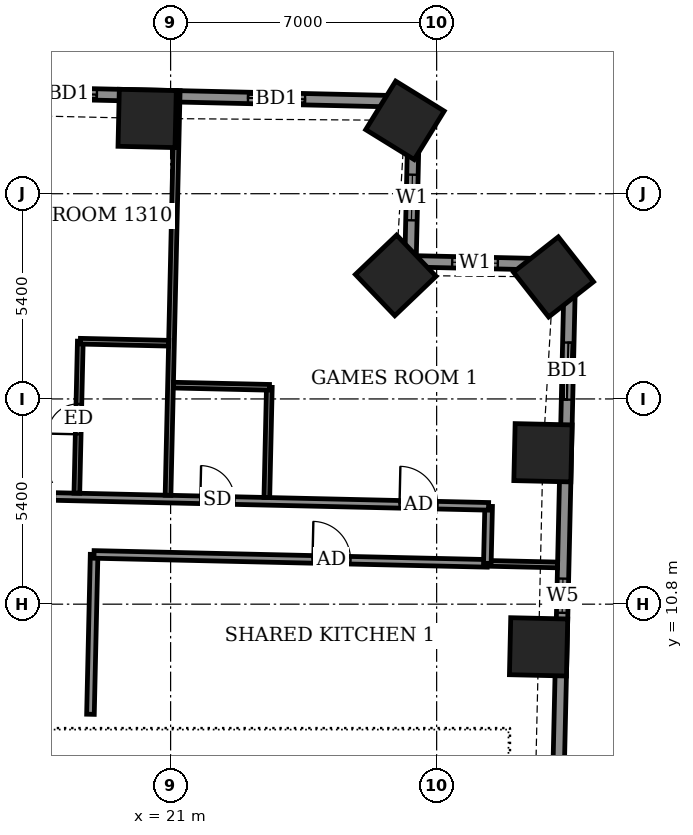
"""IFC4 building model, lengths in metres.
Left out: names, types, materials, properties, quantities, classifications, styles, units other than length and angle.
Written with IfcOpenShell. Run it as: python <this file> out.ifc"""

import sys

from ifc_helpers import new_model, si_unit, direction, frame, frame_2d, origin, origin_2d, place, context, subcontext, project, spatial, rectangle, extrude, element, fill, save


model = new_model("IFC4")
c1 = context("Model", 3, precision=1e-05, world=origin(), true_north=direction((0.0, 1.0)))
c2 = subcontext(c1, "Body", "Model", "MODEL_VIEW")
j1 = project(units=[si_unit("LENGTHUNIT", "METRE"), si_unit("PLANEANGLEUNIT", "RADIAN")], contexts=[c1])
p1 = place(None, origin())
s1 = spatial("IfcSite", under=j1, at=p1, CompositionType="ELEMENT")
p2 = place(p1, origin())
s2 = spatial("IfcBuilding", under=s1, at=p2, CompositionType="ELEMENT")
p3 = place(p2, frame((0.0, 0.0, 56.7)))
s3 = spatial("IfcBuildingStorey", under=s2, at=p3, CompositionType="ELEMENT", Elevation=56.7)
for number, where, z_axis, x_axis in (
    (1, (30.682, 9.677, -0.55), (0.0, 0.0, 1.0), (0.023, 1.0, 0.0)),
    (2, (30.798, 14.784, -0.55), (0.0, 0.0, 1.0), (0.023, 1.0, 0.0)),
    (3, (31.074, 19.41, -0.55), (0.0, 0.0, 1.0), (-0.617, 0.787, 0.0)),
    (4, (26.923, 19.451, -0.55), (0.0, 0.0, 1.0), (-0.691, 0.723, 0.0)),
    (5, (27.166, 23.53, -0.55), (0.0, 0.0, 1.0), (-0.851, 0.525, 0.0)),
    (6, (20.383, 23.58, -0.55), (0.0, 0.0, 1.0), (-1.0, 0.023, 0.0)),
):
    element("IfcColumn", number, at=place(p3, frame(where, z_axis=z_axis, x_axis=x_axis)), inside=s3, PredefinedType="COLUMN", context=c2, shape_type="SweptSolid", body=[
        extrude(rectangle(XDim=1.5, YDim=1.5, at=origin_2d()), origin(), (0.0, 0.0, 1.0), 3.6),
    ])
p4 = place(p3, frame((31.165, 4.502, 0.0), z_axis=(0.0, 0.0, 1.0), x_axis=(0.022716307128, 0.999741951401, 0.0)))
e7 = element("IfcWall", 7, at=p4, inside=s3, PredefinedType="SOLIDWALL", context=c2, shape_type="SweptSolid", body=[
    extrude(rectangle(XDim=15.229, YDim=0.3, at=frame_2d((7.615, 0.0))), origin(), (0.0, 0.0, 1.0), 3.05),
])
p5 = place(p4, frame((6.072, 0.0, 0.9)))
e8 = element("IfcOpeningElement", 8, at=p5, cuts=e7, PredefinedType="OPENING", context=c2, shape_type="SweptSolid", body=[
    extrude(rectangle(XDim=0.9, YDim=1.5, at=frame_2d((0.45, 0.75))), frame((0.0, 0.16, 0.0), z_axis=(0.0, -1.0, 0.0), x_axis=(1.0, 0.0, 0.0)), (0.0, 0.0, 1.0), 0.32),
])
p6 = place(p4, frame((11.684, 0.0, 0.0)))
e9 = element("IfcOpeningElement", 9, at=p6, cuts=e7, PredefinedType="OPENING", context=c2, shape_type="SweptSolid", body=[
    extrude(rectangle(XDim=1.5, YDim=2.4, at=frame_2d((0.75, 1.2))), frame((0.0, 0.16, 0.0), z_axis=(0.0, -1.0, 0.0), x_axis=(1.0, 0.0, 0.0)), (0.0, 0.0, 1.0), 0.32),
])
p7 = place(p3, frame((31.511, 19.727, 0.0), z_axis=(0.0, 0.0, 1.0), x_axis=(-0.999744320311, 0.022611811187, 0.0)))
e10 = element("IfcWall", 10, at=p7, inside=s3, PredefinedType="SOLIDWALL", context=c2, shape_type="SweptSolid", body=[
    extrude(rectangle(XDim=4.2, YDim=0.3, at=frame_2d((2.1, 0.0))), origin(), (0.0, 0.0, 1.0), 3.05),
])
p8 = place(p7, frame((1.902, 0.0, 0.9)))
e11 = element("IfcOpeningElement", 11, at=p8, cuts=e10, PredefinedType="OPENING", context=c2, shape_type="SweptSolid", body=[
    extrude(rectangle(XDim=1.2, YDim=1.5, at=frame_2d((0.6, 0.75))), frame((0.0, 0.16, 0.0), z_axis=(0.0, -1.0, 0.0), x_axis=(1.0, 0.0, 0.0)), (0.0, 0.0, 1.0), 0.32),
])
p9 = place(p3, frame((27.312, 19.822, 0.0), z_axis=(0.0, 0.0, 1.0), x_axis=(0.022611811187, 0.999744320311, 0.0)))
e12 = element("IfcWall", 12, at=p9, inside=s3, PredefinedType="SOLIDWALL", context=c2, shape_type="SweptSolid", body=[
    extrude(rectangle(XDim=4.2, YDim=0.3, at=frame_2d((2.1, 0.0))), origin(), (0.0, 0.0, 1.0), 2.55),
])
p10 = place(p9, frame((1.079, 0.0, 0.9)))
e13 = element("IfcOpeningElement", 13, at=p10, cuts=e12, PredefinedType="OPENING", context=c2, shape_type="SweptSolid", body=[
    extrude(rectangle(XDim=1.2, YDim=1.5, at=frame_2d((0.6, 0.75))), frame((0.0, 0.16, 0.0), z_axis=(0.0, -1.0, 0.0), x_axis=(1.0, 0.0, 0.0)), (0.0, 0.0, 1.0), 0.32),
])
p11 = place(p3, frame((27.407, 24.021, 0.0), z_axis=(0.0, 0.0, 1.0), x_axis=(-0.99974239923, 0.022696589664, 0.0)))
e14 = element("IfcWall", 14, at=p11, inside=s3, PredefinedType="SOLIDWALL", context=c2, shape_type="SweptSolid", body=[
    extrude(rectangle(XDim=49.836, YDim=0.3, at=frame_2d((24.918, 0.0))), origin(), (0.0, 0.0, 1.0), 3.05),
])
p12 = place(p11, frame((2.871, 0.0, 0.0)))
e15 = element("IfcOpeningElement", 15, at=p12, cuts=e14, PredefinedType="OPENING", context=c2, shape_type="SweptSolid", body=[
    extrude(rectangle(XDim=1.5, YDim=2.4, at=frame_2d((0.75, 1.2))), frame((0.0, 0.16, 0.0), z_axis=(0.0, -1.0, 0.0), x_axis=(1.0, 0.0, 0.0)), (0.0, 0.0, 1.0), 0.32),
])
p13 = place(p11, frame((8.349, 0.0, 0.0)))
e16 = element("IfcOpeningElement", 16, at=p13, cuts=e14, PredefinedType="OPENING", context=c2, shape_type="SweptSolid", body=[
    extrude(rectangle(XDim=1.5, YDim=2.4, at=frame_2d((0.75, 1.2))), frame((0.0, 0.16, 0.0), z_axis=(0.0, -1.0, 0.0), x_axis=(1.0, 0.0, 0.0)), (0.0, 0.0, 1.0), 0.32),
])
p14 = place(p11, frame((11.43, 0.0, 0.0)))
e17 = element("IfcOpeningElement", 17, at=p14, cuts=e14, PredefinedType="OPENING", context=c2, shape_type="SweptSolid", body=[
    extrude(rectangle(XDim=1.5, YDim=2.4, at=frame_2d((0.75, 1.2))), frame((0.0, 0.16, 0.0), z_axis=(0.0, -1.0, 0.0), x_axis=(1.0, 0.0, 0.0)), (0.0, 0.0, 1.0), 0.32),
])
p15 = place(p11, frame((17.236, 0.0, 0.0)))
e18 = element("IfcOpeningElement", 18, at=p15, cuts=e14, PredefinedType="OPENING", context=c2, shape_type="SweptSolid", body=[
    extrude(rectangle(XDim=1.5, YDim=2.4, at=frame_2d((0.75, 1.2))), frame((0.0, 0.16, 0.0), z_axis=(0.0, -1.0, 0.0), x_axis=(1.0, 0.0, 0.0)), (0.0, 0.0, 1.0), 0.32),
])
p16 = place(p11, frame((22.686, 0.0, 0.0)))
e19 = element("IfcOpeningElement", 19, at=p16, cuts=e14, PredefinedType="OPENING", context=c2, shape_type="SweptSolid", body=[
    extrude(rectangle(XDim=1.5, YDim=2.4, at=frame_2d((0.75, 1.2))), frame((0.0, 0.16, 0.0), z_axis=(0.0, -1.0, 0.0), x_axis=(1.0, 0.0, 0.0)), (0.0, 0.0, 1.0), 0.32),
])
p17 = place(p11, frame((25.767, 0.0, 0.0)))
e20 = element("IfcOpeningElement", 20, at=p17, cuts=e14, PredefinedType="OPENING", context=c2, shape_type="SweptSolid", body=[
    extrude(rectangle(XDim=1.5, YDim=2.4, at=frame_2d((0.75, 1.2))), frame((0.0, 0.16, 0.0), z_axis=(0.0, -1.0, 0.0), x_axis=(1.0, 0.0, 0.0)), (0.0, 0.0, 1.0), 0.32),
])
p18 = place(p11, frame((31.211, 0.0, 0.0)))
e21 = element("IfcOpeningElement", 21, at=p18, cuts=e14, PredefinedType="OPENING", context=c2, shape_type="SweptSolid", body=[
    extrude(rectangle(XDim=1.5, YDim=2.4, at=frame_2d((0.75, 1.2))), frame((0.0, 0.16, 0.0), z_axis=(0.0, -1.0, 0.0), x_axis=(1.0, 0.0, 0.0)), (0.0, 0.0, 1.0), 0.32),
])
p19 = place(p11, frame((36.974, 0.0, 0.0)))
e22 = element("IfcOpeningElement", 22, at=p19, cuts=e14, PredefinedType="OPENING", context=c2, shape_type="SweptSolid", body=[
    extrude(rectangle(XDim=1.5, YDim=2.4, at=frame_2d((0.75, 1.2))), frame((0.0, 0.16, 0.0), z_axis=(0.0, -1.0, 0.0), x_axis=(1.0, 0.0, 0.0)), (0.0, 0.0, 1.0), 0.32),
])
p20 = place(p11, frame((40.055, 0.0, 0.0)))
e23 = element("IfcOpeningElement", 23, at=p20, cuts=e14, PredefinedType="OPENING", context=c2, shape_type="SweptSolid", body=[
    extrude(rectangle(XDim=1.5, YDim=2.4, at=frame_2d((0.75, 1.2))), frame((0.0, 0.16, 0.0), z_axis=(0.0, -1.0, 0.0), x_axis=(1.0, 0.0, 0.0)), (0.0, 0.0, 1.0), 0.32),
])
p21 = place(p11, frame((45.282, 0.0, 0.9)))
e24 = element("IfcOpeningElement", 24, at=p21, cuts=e14, PredefinedType="OPENING", context=c2, shape_type="SweptSolid", body=[
    extrude(rectangle(XDim=2.4, YDim=1.5, at=frame_2d((1.2, 0.75))), frame((0.0, 0.16, 0.0), z_axis=(0.0, -1.0, 0.0), x_axis=(1.0, 0.0, 0.0)), (0.0, 0.0, 1.0), 0.32),
])
p22 = place(p3, frame((18.891, 7.903, 0.0), z_axis=(0.0, 0.0, 1.0), x_axis=(0.022807092041, 0.999739884446, 0.0)))
e25 = element("IfcWall", 25, at=p22, inside=s3, PredefinedType="PARTITIONING", context=c2, shape_type="SweptSolid", body=[
    extrude(rectangle(XDim=4.207, YDim=0.2, at=frame_2d((2.104, 0.0))), origin(), (0.0, 0.0, 1.0), 3.05),
])
p23 = place(p3, frame((18.985, 12.109, 0.0), z_axis=(0.0, 0.0, 1.0), x_axis=(0.999742480592, -0.022693005506, 0.0)))
e26 = element("IfcWall", 26, at=p23, inside=s3, PredefinedType="PARTITIONING", context=c2, shape_type="SweptSolid", body=[
    extrude(rectangle(XDim=10.35, YDim=0.2, at=frame_2d((5.175, 0.0))), origin(), (0.0, 0.0, 1.0), 3.05),
])
p24 = place(p23, frame((5.75, 0.0, 0.0)))
e27 = element("IfcOpeningElement", 27, at=p24, cuts=e26, PredefinedType="OPENING", context=c2, shape_type="SweptSolid", body=[
    extrude(rectangle(XDim=1.0, YDim=2.1, at=frame_2d((0.5, 1.05))), frame((0.0, 0.11, 0.0), z_axis=(0.0, -1.0, 0.0), x_axis=(1.0, 0.0, 0.0)), (0.0, 0.0, 1.0), 0.22),
])
p25 = place(p3, frame((29.332, 11.874, 0.0), z_axis=(0.0, 0.0, 1.0), x_axis=(0.999742448242, -0.022694430658, 0.0)))
e28 = element("IfcWall", 28, at=p25, inside=s3, PredefinedType="PARTITIONING", context=c2, shape_type="SweptSolid", body=[
    extrude(rectangle(XDim=1.85, YDim=0.15, at=frame_2d((0.925, 0.0))), origin(), (0.0, 0.0, 1.0), 2.55),
])
p26 = place(p3, frame((29.334, 11.874, 0.0), z_axis=(0.0, 0.0, 1.0), x_axis=(0.022617910375, 0.999744182344, 0.0)))
e29 = element("IfcWall", 29, at=p26, inside=s3, PredefinedType="PARTITIONING", context=c2, shape_type="SweptSolid", body=[
    extrude(rectangle(XDim=1.5, YDim=0.2, at=frame_2d((0.75, 0.0))), origin(), (0.0, 0.0, 1.0), 3.05),
])
p27 = place(p3, frame((-25.456, 14.618, 0.0), z_axis=(0.0, 0.0, 1.0), x_axis=(0.999742687583, -0.0226838847, 0.0)))
e30 = element("IfcWall", 30, at=p27, inside=s3, PredefinedType="PARTITIONING", context=c2, shape_type="SweptSolid", body=[
    extrude(rectangle(XDim=54.836, YDim=0.2, at=frame_2d((27.418, 0.0))), origin(), (0.0, 0.0, 1.0), 3.05),
])
p28 = place(p27, frame((52.493, 0.0, 0.0)))
e31 = element("IfcOpeningElement", 31, at=p28, cuts=e30, PredefinedType="OPENING", context=c2, shape_type="SweptSolid", body=[
    extrude(rectangle(XDim=1.0, YDim=2.1, at=frame_2d((0.5, 1.05))), frame((0.0, 0.11, 0.0), z_axis=(0.0, -1.0, 0.0), x_axis=(1.0, 0.0, 0.0)), (0.0, 0.0, 1.0), 0.22),
])
p29 = place(p27, frame((47.25, 0.0, 0.0)))
e32 = element("IfcOpeningElement", 32, at=p29, cuts=e30, PredefinedType="OPENING", context=c2, shape_type="SweptSolid", body=[
    extrude(rectangle(XDim=0.9, YDim=2.1, at=frame_2d((0.45, 1.05))), frame((0.0, 0.11, 0.0), z_axis=(0.0, -1.0, 0.0), x_axis=(1.0, 0.0, 0.0)), (0.0, 0.0, 1.0), 0.22),
])
p30 = place(p27, frame((42.525, 0.0, 0.0)))
e33 = element("IfcOpeningElement", 33, at=p30, cuts=e30, PredefinedType="OPENING", context=c2, shape_type="SweptSolid", body=[
    extrude(rectangle(XDim=0.9, YDim=2.1, at=frame_2d((0.45, 1.05))), frame((0.0, 0.11, 0.0), z_axis=(0.0, -1.0, 0.0), x_axis=(1.0, 0.0, 0.0)), (0.0, 0.0, 1.0), 0.22),
])
p31 = place(p27, frame((40.275, 0.0, 0.0)))
e34 = element("IfcOpeningElement", 34, at=p31, cuts=e30, PredefinedType="OPENING", context=c2, shape_type="SweptSolid", body=[
    extrude(rectangle(XDim=0.9, YDim=2.1, at=frame_2d((0.45, 1.05))), frame((0.0, 0.11, 0.0), z_axis=(0.0, -1.0, 0.0), x_axis=(1.0, 0.0, 0.0)), (0.0, 0.0, 1.0), 0.22),
])
p32 = place(p27, frame((33.0, 0.0, 0.0)))
e35 = element("IfcOpeningElement", 35, at=p32, cuts=e30, PredefinedType="OPENING", context=c2, shape_type="SweptSolid", body=[
    extrude(rectangle(XDim=0.9, YDim=2.1, at=frame_2d((0.45, 1.05))), frame((0.0, 0.11, 0.0), z_axis=(0.0, -1.0, 0.0), x_axis=(1.0, 0.0, 0.0)), (0.0, 0.0, 1.0), 0.22),
])
p33 = place(p27, frame((30.65, 0.0, 0.0)))
e36 = element("IfcOpeningElement", 36, at=p33, cuts=e30, PredefinedType="OPENING", context=c2, shape_type="SweptSolid", body=[
    extrude(rectangle(XDim=0.9, YDim=2.1, at=frame_2d((0.45, 1.05))), frame((0.0, 0.11, 0.0), z_axis=(0.0, -1.0, 0.0), x_axis=(1.0, 0.0, 0.0)), (0.0, 0.0, 1.0), 0.22),
])
p34 = place(p27, frame((23.7, 0.0, 0.0)))
e37 = element("IfcOpeningElement", 37, at=p34, cuts=e30, PredefinedType="OPENING", context=c2, shape_type="SweptSolid", body=[
    extrude(rectangle(XDim=0.9, YDim=2.1, at=frame_2d((0.45, 1.05))), frame((0.0, 0.11, 0.0), z_axis=(0.0, -1.0, 0.0), x_axis=(1.0, 0.0, 0.0)), (0.0, 0.0, 1.0), 0.22),
])
p35 = place(p27, frame((21.425, 0.0, 0.0)))
e38 = element("IfcOpeningElement", 38, at=p35, cuts=e30, PredefinedType="OPENING", context=c2, shape_type="SweptSolid", body=[
    extrude(rectangle(XDim=0.9, YDim=2.1, at=frame_2d((0.45, 1.05))), frame((0.0, 0.11, 0.0), z_axis=(0.0, -1.0, 0.0), x_axis=(1.0, 0.0, 0.0)), (0.0, 0.0, 1.0), 0.22),
])
p36 = place(p27, frame((14.15, 0.0, 0.0)))
e39 = element("IfcOpeningElement", 39, at=p36, cuts=e30, PredefinedType="OPENING", context=c2, shape_type="SweptSolid", body=[
    extrude(rectangle(XDim=0.9, YDim=2.1, at=frame_2d((0.45, 1.05))), frame((0.0, 0.11, 0.0), z_axis=(0.0, -1.0, 0.0), x_axis=(1.0, 0.0, 0.0)), (0.0, 0.0, 1.0), 0.22),
])
p37 = place(p27, frame((11.625, 0.0, 0.0)))
e40 = element("IfcOpeningElement", 40, at=p37, cuts=e30, PredefinedType="OPENING", context=c2, shape_type="SweptSolid", body=[
    extrude(rectangle(XDim=0.9, YDim=2.1, at=frame_2d((0.45, 1.05))), frame((0.0, 0.11, 0.0), z_axis=(0.0, -1.0, 0.0), x_axis=(1.0, 0.0, 0.0)), (0.0, 0.0, 1.0), 0.22),
])
p38 = place(p27, frame((1.425, 0.0, 0.0)))
e41 = element("IfcOpeningElement", 41, at=p38, cuts=e30, PredefinedType="OPENING", context=c2, shape_type="SweptSolid", body=[
    extrude(rectangle(XDim=1.0, YDim=2.1, at=frame_2d((0.5, 1.05))), frame((0.0, 0.11, 0.0), z_axis=(0.0, -1.0, 0.0), x_axis=(1.0, 0.0, 0.0)), (0.0, 0.0, 1.0), 0.22),
])
p39 = place(p27, frame((6.75, 0.0, 0.0)))
e42 = element("IfcOpeningElement", 42, at=p39, cuts=e30, PredefinedType="OPENING", context=c2, shape_type="SweptSolid", body=[
    extrude(rectangle(XDim=0.9, YDim=2.1, at=frame_2d((0.45, 1.05))), frame((0.0, 0.11, 0.0), z_axis=(0.0, -1.0, 0.0), x_axis=(1.0, 0.0, 0.0)), (0.0, 0.0, 1.0), 0.22),
])
p40 = place(p3, frame((18.533, 13.72, 0.0), z_axis=(0.0, 0.0, 1.0), x_axis=(0.022765770952, 0.999740826251, 0.0)))
e43 = element("IfcWall", 43, at=p40, inside=s3, PredefinedType="PARTITIONING", context=c2, shape_type="SweptSolid", body=[
    extrude(rectangle(XDim=4.0, YDim=0.15, at=frame_2d((2.0, 0.0))), origin(), (0.0, 0.0, 1.0), 3.05),
])
p41 = place(p40, frame((1.55, 0.0, 0.0)))
e44 = element("IfcOpeningElement", 44, at=p41, cuts=e43, PredefinedType="OPENING", context=c2, shape_type="SweptSolid", body=[
    extrude(rectangle(XDim=0.8, YDim=2.1, at=frame_2d((0.4, 1.05))), frame((0.0, 0.085, 0.0), z_axis=(0.0, -1.0, 0.0), x_axis=(1.0, 0.0, 0.0)), (0.0, 0.0, 1.0), 0.17),
])
p42 = place(p3, frame((20.932, 13.665, 0.0), z_axis=(0.0, 0.0, 1.0), x_axis=(0.022739109038, 0.999741433032, 0.0)))
e45 = element("IfcWall", 45, at=p42, inside=s3, PredefinedType="PARTITIONING", context=c2, shape_type="SweptSolid", body=[
    extrude(rectangle(XDim=10.651, YDim=0.15, at=frame_2d((5.325, 0.0))), origin(), (0.0, 0.0, 1.0), 2.55),
])
p43 = place(p3, frame((23.532, 13.606, 0.0), z_axis=(0.0, 0.0, 1.0), x_axis=(0.022723317103, 0.999741792094, 0.0)))
e46 = element("IfcWall", 46, at=p43, inside=s3, PredefinedType="PARTITIONING", context=c2, shape_type="SweptSolid", body=[
    extrude(rectangle(XDim=2.901, YDim=0.15, at=frame_2d((1.45, 0.0))), origin(), (0.0, 0.0, 1.0), 3.05),
])
p44 = place(p3, frame((21.075, 16.563, 0.0), z_axis=(0.0, 0.0, 1.0), x_axis=(0.999746356616, -0.022521599255, 0.0)))
e47 = element("IfcWall", 47, at=p44, inside=s3, PredefinedType="PARTITIONING", context=c2, shape_type="SweptSolid", body=[
    extrude(rectangle(XDim=2.526, YDim=0.15, at=frame_2d((1.263, 0.0))), origin(), (0.0, 0.0, 1.0), 3.05),
])
p45 = place(p3, frame((18.626, 17.719, 0.0), z_axis=(0.0, 0.0, 1.0), x_axis=(0.999740260747, -0.02279059109, 0.0)))
e48 = element("IfcWall", 48, at=p45, inside=s3, PredefinedType="PARTITIONING", context=c2, shape_type="SweptSolid", body=[
    extrude(rectangle(XDim=2.324, YDim=0.15, at=frame_2d((1.162, 0.0))), origin(), (0.0, 0.0, 1.0), 3.05),
])
p46 = place(p5, origin())
e49 = element("IfcWindow", 49, at=p46, inside=s3, PartitioningType="SINGLE_PANEL", PredefinedType="WINDOW", context=c2, shape_type="SweptSolid", body=[
    extrude(rectangle(XDim=0.9, YDim=1.5, at=frame_2d((0.45, 0.75))), frame((0.0, 0.03, 0.0), z_axis=(0.0, -1.0, 0.0), x_axis=(1.0, 0.0, 0.0)), (0.0, 0.0, 1.0), 0.06),
])
fill(e8, e49)
p47 = place(p6, origin())
e50 = element("IfcDoor", 50, at=p47, inside=s3, OperationType="SLIDING_TO_LEFT", PredefinedType="DOOR", context=c2, shape_type="SweptSolid", body=[
    extrude(rectangle(XDim=1.5, YDim=2.4, at=frame_2d((0.75, 1.2))), frame((0.0, 0.025, 0.0), z_axis=(0.0, -1.0, 0.0), x_axis=(1.0, 0.0, 0.0)), (0.0, 0.0, 1.0), 0.05),
])
fill(e9, e50)
p48 = place(p8, origin())
e51 = element("IfcWindow", 51, at=p48, inside=s3, PartitioningType="SINGLE_PANEL", PredefinedType="WINDOW", context=c2, shape_type="SweptSolid", body=[
    extrude(rectangle(XDim=1.2, YDim=1.5, at=frame_2d((0.6, 0.75))), frame((0.0, 0.03, 0.0), z_axis=(0.0, -1.0, 0.0), x_axis=(1.0, 0.0, 0.0)), (0.0, 0.0, 1.0), 0.06),
])
fill(e11, e51)
p49 = place(p10, origin())
e52 = element("IfcWindow", 52, at=p49, inside=s3, PartitioningType="SINGLE_PANEL", PredefinedType="WINDOW", context=c2, shape_type="SweptSolid", body=[
    extrude(rectangle(XDim=1.2, YDim=1.5, at=frame_2d((0.6, 0.75))), frame((0.0, 0.03, 0.0), z_axis=(0.0, -1.0, 0.0), x_axis=(1.0, 0.0, 0.0)), (0.0, 0.0, 1.0), 0.06),
])
fill(e13, e52)
p50 = place(p12, origin())
e53 = element("IfcDoor", 53, at=p50, inside=s3, OperationType="SLIDING_TO_LEFT", PredefinedType="DOOR", context=c2, shape_type="SweptSolid", body=[
    extrude(rectangle(XDim=1.5, YDim=2.4, at=frame_2d((0.75, 1.2))), frame((0.0, 0.025, 0.0), z_axis=(0.0, -1.0, 0.0), x_axis=(1.0, 0.0, 0.0)), (0.0, 0.0, 1.0), 0.05),
])
fill(e15, e53)
p51 = place(p13, origin())
e54 = element("IfcDoor", 54, at=p51, inside=s3, OperationType="SLIDING_TO_LEFT", PredefinedType="DOOR", context=c2, shape_type="SweptSolid", body=[
    extrude(rectangle(XDim=1.5, YDim=2.4, at=frame_2d((0.75, 1.2))), frame((0.0, 0.025, 0.0), z_axis=(0.0, -1.0, 0.0), x_axis=(1.0, 0.0, 0.0)), (0.0, 0.0, 1.0), 0.05),
])
fill(e16, e54)
p52 = place(p24, origin())
e55 = element("IfcDoor", 55, at=p52, inside=s3, OperationType="SINGLE_SWING_RIGHT", PredefinedType="DOOR", context=c2, shape_type="SweptSolid", body=[
    extrude(rectangle(XDim=1.0, YDim=2.1, at=frame_2d((0.5, 1.05))), frame((0.0, 0.025, 0.0), z_axis=(0.0, -1.0, 0.0), x_axis=(1.0, 0.0, 0.0)), (0.0, 0.0, 1.0), 0.05),
])
fill(e27, e55)
p53 = place(p28, origin())
e56 = element("IfcDoor", 56, at=p53, inside=s3, OperationType="SINGLE_SWING_LEFT", PredefinedType="DOOR", context=c2, shape_type="SweptSolid", body=[
    extrude(rectangle(XDim=1.0, YDim=2.1, at=frame_2d((0.5, 1.05))), frame((0.0, 0.025, 0.0), z_axis=(0.0, -1.0, 0.0), x_axis=(1.0, 0.0, 0.0)), (0.0, 0.0, 1.0), 0.05),
])
fill(e31, e56)
p54 = place(p29, origin())
e57 = element("IfcDoor", 57, at=p54, inside=s3, OperationType="SINGLE_SWING_LEFT", PredefinedType="DOOR", context=c2, shape_type="SweptSolid", body=[
    extrude(rectangle(XDim=0.9, YDim=2.1, at=frame_2d((0.45, 1.05))), frame((0.0, 0.025, 0.0), z_axis=(0.0, -1.0, 0.0), x_axis=(1.0, 0.0, 0.0)), (0.0, 0.0, 1.0), 0.05),
])
fill(e32, e57)
p55 = place(p30, origin())
e58 = element("IfcDoor", 58, at=p55, inside=s3, OperationType="SINGLE_SWING_RIGHT", PredefinedType="DOOR", context=c2, shape_type="SweptSolid", body=[
    extrude(rectangle(XDim=0.9, YDim=2.1, at=frame_2d((0.45, 1.05))), frame((0.0, 0.025, 0.0), z_axis=(0.0, -1.0, 0.0), x_axis=(1.0, 0.0, 0.0)), (0.0, 0.0, 1.0), 0.05),
])
fill(e33, e58)
p56 = place(p41, origin())
e59 = element("IfcDoor", 59, at=p56, inside=s3, OperationType="SINGLE_SWING_RIGHT", PredefinedType="DOOR", context=c2, shape_type="SweptSolid", body=[
    extrude(rectangle(XDim=0.8, YDim=2.1, at=frame_2d((0.4, 1.05))), frame((0.0, 0.025, 0.0), z_axis=(0.0, -1.0, 0.0), x_axis=(1.0, 0.0, 0.0)), (0.0, 0.0, 1.0), 0.05),
])
fill(e44, e59)
save(model, sys.argv[1])
